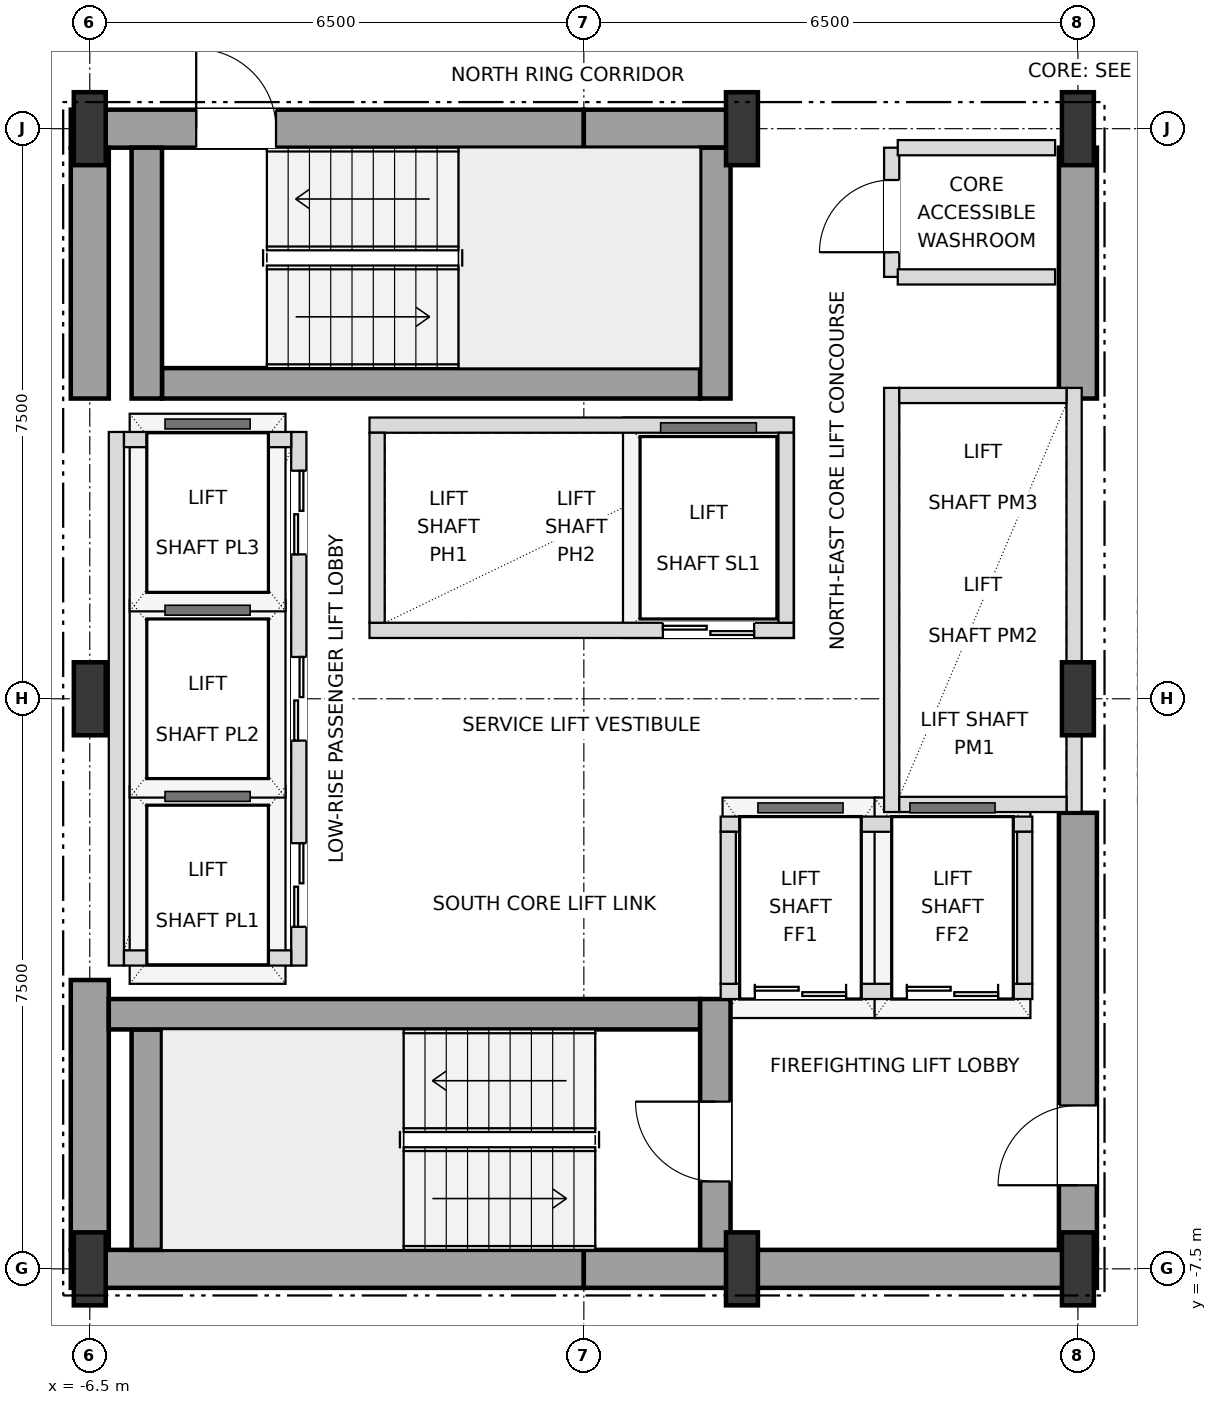
"""IFC4 building model, lengths in metres.
Left out: names, types, materials, properties, quantities, classifications, styles, units other than length and angle.
Written with IfcOpenShell. Run it as: python <this file> out.ifc"""

import sys

from ifc_helpers import new_model, si_unit, direction, frame, frame_2d, origin, origin_2d, place, context, subcontext, project, spatial, rectangle, i_section, extrude, element, fill, save


model = new_model("IFC4")
c1 = context("Model", 3, precision=1e-05, world=origin(), true_north=direction((0.0, 1.0)))
c2 = subcontext(c1, "Body", "Model", "MODEL_VIEW")
j1 = project(units=[si_unit("LENGTHUNIT", "METRE"), si_unit("PLANEANGLEUNIT", "RADIAN")], contexts=[c1])
p1 = place(None, origin())
s1 = spatial("IfcSite", under=j1, at=p1, CompositionType="ELEMENT")
p2 = place(p1, origin())
s2 = spatial("IfcBuilding", under=s1, at=p2, CompositionType="ELEMENT")
p3 = place(p2, frame((0.0, 0.0, 57.6)))
s3 = spatial("IfcBuildingStorey", under=s2, at=p3, CompositionType="ELEMENT", Elevation=57.6)
for number, where, z_axis, x_axis in (
    (1, (-6.5, -7.5, 0.0), (0.0, 0.0, 1.0), (1.0, 0.0, 0.0)),
    (2, (2.08, -7.5, 0.0), (0.0, 0.0, 1.0), (1.0, 0.0, 0.0)),
    (3, (6.5, -7.5, 0.0), (0.0, 0.0, 1.0), (1.0, 0.0, 0.0)),
    (4, (-6.5, 0.0, 0.0), (0.0, 0.0, 1.0), (1.0, 0.0, 0.0)),
    (5, (6.5, 0.0, 0.0), (0.0, 0.0, 1.0), (1.0, 0.0, 0.0)),
    (6, (-6.5, 7.5, 0.0), (0.0, 0.0, 1.0), (1.0, 0.0, 0.0)),
    (7, (2.08, 7.5, 0.0), (0.0, 0.0, 1.0), (1.0, 0.0, 0.0)),
    (8, (6.5, 7.5, 0.0), (0.0, 0.0, 1.0), (1.0, 0.0, 0.0)),
):
    element("IfcColumn", number, at=place(p3, frame(where, z_axis=z_axis, x_axis=x_axis)), inside=s3, PredefinedType="COLUMN", context=c2, shape_type="SweptSolid", body=[
        extrude(i_section(OverallWidth=0.42, OverallDepth=0.96, WebThickness=0.022, FlangeThickness=0.034, at=origin_2d()), origin(), (0.0, 0.0, 1.0), 3.6),
    ])
for number, where, z_axis, x_axis in (
    (9, (-6.75, -7.5, 0.0), (0.0, 0.0, 1.0), (1.0, 0.0, 0.0)),
    (10, (0.0, -7.5, 0.0), (0.0, 0.0, 1.0), (1.0, 0.0, 0.0)),
):
    element("IfcWall", number, at=place(p3, frame(where, z_axis=z_axis, x_axis=x_axis)), inside=s3, PredefinedType="SHEAR", context=c2, shape_type="SweptSolid", body=[
        extrude(rectangle(XDim=6.75, YDim=0.5, at=frame_2d((3.375, 0.0))), origin(), (0.0, 0.0, 1.0), 3.38),
    ])
p4 = place(p3, frame((-6.75, 7.5, 0.0), z_axis=(0.0, 0.0, 1.0), x_axis=(1.0, 0.0, 0.0)))
e11 = element("IfcWall", 11, at=p4, inside=s3, PredefinedType="SHEAR", context=c2, shape_type="SweptSolid", body=[
    extrude(rectangle(XDim=6.75, YDim=0.5, at=frame_2d((3.375, 0.0))), origin(), (0.0, 0.0, 1.0), 3.38),
])
p5 = place(p4, frame((1.65, 0.0, 0.0)))
e12 = element("IfcOpeningElement", 12, at=p5, cuts=e11, PredefinedType="OPENING", context=c2, shape_type="SweptSolid", body=[
    extrude(rectangle(XDim=1.05, YDim=2.15, at=frame_2d((0.525, 1.075))), frame((0.0, 0.26, 0.0), z_axis=(0.0, -1.0, 0.0), x_axis=(1.0, 0.0, 0.0)), (0.0, 0.0, 1.0), 0.52),
])
p6 = place(p3, frame((0.0, 7.5, 0.0), z_axis=(0.0, 0.0, 1.0), x_axis=(1.0, 0.0, 0.0)))
e13 = element("IfcWall", 13, at=p6, inside=s3, PredefinedType="SHEAR", context=c2, shape_type="SweptSolid", body=[
    extrude(rectangle(XDim=2.08, YDim=0.5, at=frame_2d((1.04, 0.0))), origin(), (0.0, 0.0, 1.0), 3.38),
])
p7 = place(p3, frame((-6.5, -7.25, 0.0), z_axis=(0.0, 0.0, 1.0), x_axis=(0.0, 1.0, 0.0)))
e14 = element("IfcWall", 14, at=p7, inside=s3, PredefinedType="SHEAR", context=c2, shape_type="SweptSolid", body=[
    extrude(rectangle(XDim=3.55, YDim=0.5, at=frame_2d((1.775, 0.0))), origin(), (0.0, 0.0, 1.0), 3.38),
])
p8 = place(p3, frame((-6.5, 3.95, 0.0), z_axis=(0.0, 0.0, 1.0), x_axis=(0.0, 1.0, 0.0)))
e15 = element("IfcWall", 15, at=p8, inside=s3, PredefinedType="SHEAR", context=c2, shape_type="SweptSolid", body=[
    extrude(rectangle(XDim=3.3, YDim=0.5, at=frame_2d((1.65, 0.0))), origin(), (0.0, 0.0, 1.0), 3.38),
])
p9 = place(p3, frame((6.5, -7.25, 0.0), z_axis=(0.0, 0.0, 1.0), x_axis=(0.0, 1.0, 0.0)))
e16 = element("IfcWall", 16, at=p9, inside=s3, PredefinedType="SHEAR", context=c2, shape_type="SweptSolid", body=[
    extrude(rectangle(XDim=5.75, YDim=0.5, at=frame_2d((2.875, 0.0))), origin(), (0.0, 0.0, 1.0), 3.38),
])
p10 = place(p9, frame((0.85, 0.0, 0.0)))
e17 = element("IfcOpeningElement", 17, at=p10, cuts=e16, PredefinedType="OPENING", context=c2, shape_type="SweptSolid", body=[
    extrude(rectangle(XDim=1.05, YDim=2.15, at=frame_2d((0.525, 1.075))), frame((0.0, 0.26, 0.0), z_axis=(0.0, -1.0, 0.0), x_axis=(1.0, 0.0, 0.0)), (0.0, 0.0, 1.0), 0.52),
])
p11 = place(p3, frame((6.5, 3.95, 0.0), z_axis=(0.0, 0.0, 1.0), x_axis=(0.0, 1.0, 0.0)))
e18 = element("IfcWall", 18, at=p11, inside=s3, PredefinedType="SHEAR", context=c2, shape_type="SweptSolid", body=[
    extrude(rectangle(XDim=3.3, YDim=0.5, at=frame_2d((1.65, 0.0))), origin(), (0.0, 0.0, 1.0), 3.38),
])
p12 = place(p3, frame((-5.75, -7.25, 0.0), z_axis=(0.0, 0.0, 1.0), x_axis=(0.0, 1.0, 0.0)))
e19 = element("IfcWall", 19, at=p12, inside=s3, PredefinedType="SHEAR", context=c2, shape_type="SweptSolid", body=[
    extrude(rectangle(XDim=2.9, YDim=0.4, at=frame_2d((1.45, 0.0))), origin(), (0.0, 0.0, 1.0), 3.38),
])
p13 = place(p3, frame((-6.25, -4.15, 0.0), z_axis=(0.0, 0.0, 1.0), x_axis=(1.0, 0.0, 0.0)))
e20 = element("IfcWall", 20, at=p13, inside=s3, PredefinedType="SHEAR", context=c2, shape_type="SweptSolid", body=[
    extrude(rectangle(XDim=7.78, YDim=0.4, at=frame_2d((3.89, 0.0))), origin(), (0.0, 0.0, 1.0), 3.38),
])
p14 = place(p3, frame((1.73, -7.25, 0.0), z_axis=(0.0, 0.0, 1.0), x_axis=(0.0, 1.0, 0.0)))
e21 = element("IfcWall", 21, at=p14, inside=s3, PredefinedType="SHEAR", context=c2, shape_type="SweptSolid", body=[
    extrude(rectangle(XDim=3.3, YDim=0.4, at=frame_2d((1.65, 0.0))), origin(), (0.0, 0.0, 1.0), 3.38),
])
p15 = place(p14, frame((0.9, 0.0, 0.0)))
e22 = element("IfcOpeningElement", 22, at=p15, cuts=e21, PredefinedType="OPENING", context=c2, shape_type="SweptSolid", body=[
    extrude(rectangle(XDim=1.05, YDim=2.15, at=frame_2d((0.525, 1.075))), frame((0.0, 0.21, 0.0), z_axis=(0.0, -1.0, 0.0), x_axis=(1.0, 0.0, 0.0)), (0.0, 0.0, 1.0), 0.42),
])
p16 = place(p3, frame((-5.55, 4.15, 0.0), z_axis=(0.0, 0.0, 1.0), x_axis=(1.0, 0.0, 0.0)))
e23 = element("IfcWall", 23, at=p16, inside=s3, PredefinedType="SHEAR", context=c2, shape_type="SweptSolid", body=[
    extrude(rectangle(XDim=7.08, YDim=0.4, at=frame_2d((3.54, 0.0))), origin(), (0.0, 0.0, 1.0), 3.38),
])
for number, where, z_axis, x_axis in (
    (24, (1.73, 3.95, 0.0), (0.0, 0.0, 1.0), (0.0, 1.0, 0.0)),
    (25, (-5.75, 3.95, 0.0), (0.0, 0.0, 1.0), (0.0, 1.0, 0.0)),
):
    element("IfcWall", number, at=place(p3, frame(where, z_axis=z_axis, x_axis=x_axis)), inside=s3, PredefinedType="SHEAR", context=c2, shape_type="SweptSolid", body=[
        extrude(rectangle(XDim=3.3, YDim=0.4, at=frame_2d((1.65, 0.0))), origin(), (0.0, 0.0, 1.0), 3.38),
    ])
p17 = place(p3, frame((-3.75, -3.51, 0.0), z_axis=(0.0, 0.0, 1.0), x_axis=(0.0, 1.0, 0.0)))
e26 = element("IfcWall", 26, at=p17, inside=s3, PredefinedType="SOLIDWALL", context=c2, shape_type="SweptSolid", body=[
    extrude(rectangle(XDim=7.02, YDim=0.2, at=frame_2d((3.51, 0.0))), origin(), (0.0, 0.0, 1.0), 3.38),
])
p18 = place(p17, frame((0.51, 0.0, 0.0)))
e27 = element("IfcOpeningElement", 27, at=p18, cuts=e26, PredefinedType="OPENING", context=c2, shape_type="SweptSolid", body=[
    extrude(rectangle(XDim=1.1, YDim=2.15, at=frame_2d((0.55, 1.075))), frame((0.0, 0.11, 0.0), z_axis=(0.0, -1.0, 0.0), x_axis=(1.0, 0.0, 0.0)), (0.0, 0.0, 1.0), 0.22),
])
p19 = place(p17, frame((2.96, 0.0, 0.0)))
e28 = element("IfcOpeningElement", 28, at=p19, cuts=e26, PredefinedType="OPENING", context=c2, shape_type="SweptSolid", body=[
    extrude(rectangle(XDim=1.1, YDim=2.15, at=frame_2d((0.55, 1.075))), frame((0.0, 0.11, 0.0), z_axis=(0.0, -1.0, 0.0), x_axis=(1.0, 0.0, 0.0)), (0.0, 0.0, 1.0), 0.22),
])
p20 = place(p17, frame((5.41, 0.0, 0.0)))
e29 = element("IfcOpeningElement", 29, at=p20, cuts=e26, PredefinedType="OPENING", context=c2, shape_type="SweptSolid", body=[
    extrude(rectangle(XDim=1.1, YDim=2.15, at=frame_2d((0.55, 1.075))), frame((0.0, 0.11, 0.0), z_axis=(0.0, -1.0, 0.0), x_axis=(1.0, 0.0, 0.0)), (0.0, 0.0, 1.0), 0.22),
])
p21 = place(p3, frame((-6.15, -3.51, 0.0), z_axis=(0.0, 0.0, 1.0), x_axis=(0.0, 1.0, 0.0)))
e30 = element("IfcWall", 30, at=p21, inside=s3, PredefinedType="SOLIDWALL", context=c2, shape_type="SweptSolid", body=[
    extrude(rectangle(XDim=7.02, YDim=0.2, at=frame_2d((3.51, 0.0))), origin(), (0.0, 0.0, 1.0), 3.38),
])
for number, where, z_axis, x_axis in (
    (31, (-6.05, -3.41, 0.0), (0.0, 0.0, 1.0), (1.0, 0.0, 0.0)),
    (32, (-6.05, 3.41, 0.0), (0.0, 0.0, 1.0), (1.0, 0.0, 0.0)),
):
    element("IfcWall", number, at=place(p3, frame(where, z_axis=z_axis, x_axis=x_axis)), inside=s3, PredefinedType="SOLIDWALL", context=c2, shape_type="SweptSolid", body=[
        extrude(rectangle(XDim=2.2, YDim=0.2, at=frame_2d((1.1, 0.0))), origin(), (0.0, 0.0, 1.0), 3.38),
    ])
p22 = place(p3, frame((4.05, -1.49, 0.0), z_axis=(0.0, 0.0, 1.0), x_axis=(0.0, 1.0, 0.0)))
e33 = element("IfcWall", 33, at=p22, inside=s3, PredefinedType="SOLIDWALL", context=c2, shape_type="SweptSolid", body=[
    extrude(rectangle(XDim=5.58, YDim=0.2, at=frame_2d((2.79, 0.0))), origin(), (0.0, 0.0, 1.0), 3.38),
])
p23 = place(p3, frame((6.45, -1.49, 0.0), z_axis=(0.0, 0.0, 1.0), x_axis=(0.0, 1.0, 0.0)))
e34 = element("IfcWall", 34, at=p23, inside=s3, PredefinedType="SOLIDWALL", context=c2, shape_type="SweptSolid", body=[
    extrude(rectangle(XDim=5.58, YDim=0.2, at=frame_2d((2.79, 0.0))), origin(), (0.0, 0.0, 1.0), 2.816),
])
for number, where, z_axis, x_axis in (
    (35, (4.15, -1.39, 0.0), (0.0, 0.0, 1.0), (1.0, 0.0, 0.0)),
    (36, (4.15, 3.99, 0.0), (0.0, 0.0, 1.0), (1.0, 0.0, 0.0)),
):
    element("IfcWall", number, at=place(p3, frame(where, z_axis=z_axis, x_axis=x_axis)), inside=s3, PredefinedType="SOLIDWALL", context=c2, shape_type="SweptSolid", body=[
        extrude(rectangle(XDim=2.2, YDim=0.2, at=frame_2d((1.1, 0.0))), origin(), (0.0, 0.0, 1.0), 3.38),
    ])
p24 = place(p3, frame((-2.82, 0.9, 0.0), z_axis=(0.0, 0.0, 1.0), x_axis=(1.0, 0.0, 0.0)))
e37 = element("IfcWall", 37, at=p24, inside=s3, PredefinedType="SOLIDWALL", context=c2, shape_type="SweptSolid", body=[
    extrude(rectangle(XDim=5.58, YDim=0.2, at=frame_2d((2.79, 0.0))), origin(), (0.0, 0.0, 1.0), 3.38),
])
p25 = place(p24, frame((3.86, 0.0, 0.0)))
e38 = element("IfcOpeningElement", 38, at=p25, cuts=e37, PredefinedType="OPENING", context=c2, shape_type="SweptSolid", body=[
    extrude(rectangle(XDim=1.2, YDim=2.2, at=frame_2d((0.6, 1.1))), frame((0.0, 0.11, 0.0), z_axis=(0.0, -1.0, 0.0), x_axis=(1.0, 0.0, 0.0)), (0.0, 0.0, 1.0), 0.22),
])
p26 = place(p3, frame((-2.82, 3.6, 0.0), z_axis=(0.0, 0.0, 1.0), x_axis=(1.0, 0.0, 0.0)))
e39 = element("IfcWall", 39, at=p26, inside=s3, PredefinedType="SOLIDWALL", context=c2, shape_type="SweptSolid", body=[
    extrude(rectangle(XDim=5.58, YDim=0.2, at=frame_2d((2.79, 0.0))), origin(), (0.0, 0.0, 1.0), 3.38),
])
for number, where, z_axis, x_axis in (
    (40, (-2.72, 1.0, 0.0), (0.0, 0.0, 1.0), (0.0, 1.0, 0.0)),
    (41, (2.66, 1.0, 0.0), (0.0, 0.0, 1.0), (0.0, 1.0, 0.0)),
):
    element("IfcWall", number, at=place(p3, frame(where, z_axis=z_axis, x_axis=x_axis)), inside=s3, PredefinedType="SOLIDWALL", context=c2, shape_type="SweptSolid", body=[
        extrude(rectangle(XDim=2.5, YDim=0.2, at=frame_2d((1.25, 0.0))), origin(), (0.0, 0.0, 1.0), 3.38),
    ])
p27 = place(p3, frame((1.8, -3.85, 0.0), z_axis=(0.0, 0.0, 1.0), x_axis=(1.0, 0.0, 0.0)))
e42 = element("IfcWall", 42, at=p27, inside=s3, PredefinedType="SOLIDWALL", context=c2, shape_type="SweptSolid", body=[
    extrude(rectangle(XDim=4.1, YDim=0.2, at=frame_2d((2.05, 0.0))), origin(), (0.0, 0.0, 1.0), 3.38),
])
p28 = place(p27, frame((0.45, 0.0, 0.0)))
e43 = element("IfcOpeningElement", 43, at=p28, cuts=e42, PredefinedType="OPENING", context=c2, shape_type="SweptSolid", body=[
    extrude(rectangle(XDim=1.2, YDim=2.2, at=frame_2d((0.6, 1.1))), frame((0.0, 0.11, 0.0), z_axis=(0.0, -1.0, 0.0), x_axis=(1.0, 0.0, 0.0)), (0.0, 0.0, 1.0), 0.22),
])
p29 = place(p27, frame((2.45, 0.0, 0.0)))
e44 = element("IfcOpeningElement", 44, at=p29, cuts=e42, PredefinedType="OPENING", context=c2, shape_type="SweptSolid", body=[
    extrude(rectangle(XDim=1.2, YDim=2.2, at=frame_2d((0.6, 1.1))), frame((0.0, 0.11, 0.0), z_axis=(0.0, -1.0, 0.0), x_axis=(1.0, 0.0, 0.0)), (0.0, 0.0, 1.0), 0.22),
])
p30 = place(p3, frame((1.8, -1.65, 0.0), z_axis=(0.0, 0.0, 1.0), x_axis=(1.0, 0.0, 0.0)))
e45 = element("IfcWall", 45, at=p30, inside=s3, PredefinedType="SOLIDWALL", context=c2, shape_type="SweptSolid", body=[
    extrude(rectangle(XDim=4.1, YDim=0.2, at=frame_2d((2.05, 0.0))), origin(), (0.0, 0.0, 1.0), 3.38),
])
for number, where, z_axis, x_axis in (
    (46, (1.9, -3.75, 0.0), (0.0, 0.0, 1.0), (0.0, 1.0, 0.0)),
    (47, (5.8, -3.75, 0.0), (0.0, 0.0, 1.0), (0.0, 1.0, 0.0)),
):
    element("IfcWall", number, at=place(p3, frame(where, z_axis=z_axis, x_axis=x_axis)), inside=s3, PredefinedType="SOLIDWALL", context=c2, shape_type="SweptSolid", body=[
        extrude(rectangle(XDim=2.0, YDim=0.2, at=frame_2d((1.0, 0.0))), origin(), (0.0, 0.0, 1.0), 3.38),
    ])
p31 = place(p3, frame((4.05, 5.55, 0.0), z_axis=(0.0, 0.0, 1.0), x_axis=(0.0, 1.0, 0.0)))
e48 = element("IfcWall", 48, at=p31, inside=s3, PredefinedType="SOLIDWALL", context=c2, shape_type="SweptSolid", body=[
    extrude(rectangle(XDim=1.7, YDim=0.2, at=frame_2d((0.85, 0.0))), origin(), (0.0, 0.0, 1.0), 3.38),
])
p32 = place(p31, frame((0.325, 0.0, 0.0)))
e49 = element("IfcOpeningElement", 49, at=p32, cuts=e48, PredefinedType="OPENING", context=c2, shape_type="SweptSolid", body=[
    extrude(rectangle(XDim=0.95, YDim=2.15, at=frame_2d((0.475, 1.075))), frame((0.0, 0.11, 0.0), z_axis=(0.0, -1.0, 0.0), x_axis=(1.0, 0.0, 0.0)), (0.0, 0.0, 1.0), 0.22),
])
for number, where, z_axis, x_axis in (
    (50, (4.13, 5.55, 0.0), (0.0, 0.0, 1.0), (1.0, 0.0, 0.0)),
    (51, (4.13, 7.25, 0.0), (0.0, 0.0, 1.0), (1.0, 0.0, 0.0)),
):
    element("IfcWall", number, at=place(p3, frame(where, z_axis=z_axis, x_axis=x_axis)), inside=s3, PredefinedType="SOLIDWALL", context=c2, shape_type="SweptSolid", body=[
        extrude(rectangle(XDim=2.07, YDim=0.2, at=frame_2d((1.035, 0.0))), origin(), (0.0, 0.0, 1.0), 3.38),
    ])
p33 = place(p10, origin())
e52 = element("IfcDoor", 52, at=p33, inside=s3, OperationType="SINGLE_SWING_LEFT", PredefinedType="DOOR", context=c2, shape_type="SweptSolid", body=[
    extrude(rectangle(XDim=1.05, YDim=2.15, at=frame_2d((0.525, 1.075))), frame((0.0, 0.025, 0.0), z_axis=(0.0, -1.0, 0.0), x_axis=(1.0, 0.0, 0.0)), (0.0, 0.0, 1.0), 0.05),
])
fill(e17, e52)
p34 = place(p15, origin())
e53 = element("IfcDoor", 53, at=p34, inside=s3, OperationType="SINGLE_SWING_RIGHT", PredefinedType="DOOR", context=c2, shape_type="SweptSolid", body=[
    extrude(rectangle(XDim=1.05, YDim=2.15, at=frame_2d((0.525, 1.075))), frame((0.0, 0.025, 0.0), z_axis=(0.0, -1.0, 0.0), x_axis=(1.0, 0.0, 0.0)), (0.0, 0.0, 1.0), 0.05),
])
fill(e22, e53)
p35 = place(p5, origin())
e54 = element("IfcDoor", 54, at=p35, inside=s3, OperationType="SINGLE_SWING_LEFT", PredefinedType="DOOR", context=c2, shape_type="SweptSolid", body=[
    extrude(rectangle(XDim=1.05, YDim=2.15, at=frame_2d((0.525, 1.075))), frame((0.0, 0.025, 0.0), z_axis=(0.0, -1.0, 0.0), x_axis=(1.0, 0.0, 0.0)), (0.0, 0.0, 1.0), 0.05),
])
fill(e12, e54)
p36 = place(p18, origin())
e55 = element("IfcDoor", 55, at=p36, inside=s3, OperationType="DOUBLE_DOOR_SLIDING", PredefinedType="DOOR", context=c2, shape_type="SweptSolid", body=[
    extrude(rectangle(XDim=1.1, YDim=2.15, at=frame_2d((0.55, 1.075))), frame((0.0, 0.025, 0.0), z_axis=(0.0, -1.0, 0.0), x_axis=(1.0, 0.0, 0.0)), (0.0, 0.0, 1.0), 0.05),
])
fill(e27, e55)
p37 = place(p19, origin())
e56 = element("IfcDoor", 56, at=p37, inside=s3, OperationType="DOUBLE_DOOR_SLIDING", PredefinedType="DOOR", context=c2, shape_type="SweptSolid", body=[
    extrude(rectangle(XDim=1.1, YDim=2.15, at=frame_2d((0.55, 1.075))), frame((0.0, 0.025, 0.0), z_axis=(0.0, -1.0, 0.0), x_axis=(1.0, 0.0, 0.0)), (0.0, 0.0, 1.0), 0.05),
])
fill(e28, e56)
p38 = place(p20, origin())
e57 = element("IfcDoor", 57, at=p38, inside=s3, OperationType="DOUBLE_DOOR_SLIDING", PredefinedType="DOOR", context=c2, shape_type="SweptSolid", body=[
    extrude(rectangle(XDim=1.1, YDim=2.15, at=frame_2d((0.55, 1.075))), frame((0.0, 0.025, 0.0), z_axis=(0.0, -1.0, 0.0), x_axis=(1.0, 0.0, 0.0)), (0.0, 0.0, 1.0), 0.05),
])
fill(e29, e57)
p39 = place(p25, origin())
e58 = element("IfcDoor", 58, at=p39, inside=s3, OperationType="DOUBLE_DOOR_SLIDING", PredefinedType="DOOR", context=c2, shape_type="SweptSolid", body=[
    extrude(rectangle(XDim=1.2, YDim=2.2, at=frame_2d((0.6, 1.1))), frame((0.0, 0.025, 0.0), z_axis=(0.0, -1.0, 0.0), x_axis=(1.0, 0.0, 0.0)), (0.0, 0.0, 1.0), 0.05),
])
fill(e38, e58)
p40 = place(p28, origin())
e59 = element("IfcDoor", 59, at=p40, inside=s3, OperationType="DOUBLE_DOOR_SLIDING", PredefinedType="DOOR", context=c2, shape_type="SweptSolid", body=[
    extrude(rectangle(XDim=1.2, YDim=2.2, at=frame_2d((0.6, 1.1))), frame((0.0, 0.025, 0.0), z_axis=(0.0, -1.0, 0.0), x_axis=(1.0, 0.0, 0.0)), (0.0, 0.0, 1.0), 0.05),
])
fill(e43, e59)
p41 = place(p29, origin())
e60 = element("IfcDoor", 60, at=p41, inside=s3, OperationType="DOUBLE_DOOR_SLIDING", PredefinedType="DOOR", context=c2, shape_type="SweptSolid", body=[
    extrude(rectangle(XDim=1.2, YDim=2.2, at=frame_2d((0.6, 1.1))), frame((0.0, 0.025, 0.0), z_axis=(0.0, -1.0, 0.0), x_axis=(1.0, 0.0, 0.0)), (0.0, 0.0, 1.0), 0.05),
])
fill(e44, e60)
p42 = place(p32, origin())
e61 = element("IfcDoor", 61, at=p42, inside=s3, OperationType="SINGLE_SWING_LEFT", PredefinedType="DOOR", context=c2, shape_type="SweptSolid", body=[
    extrude(rectangle(XDim=0.95, YDim=2.15, at=frame_2d((0.475, 1.075))), frame((0.0, 0.025, 0.0), z_axis=(0.0, -1.0, 0.0), x_axis=(1.0, 0.0, 0.0)), (0.0, 0.0, 1.0), 0.05),
])
fill(e49, e61)
save(model, sys.argv[1])
